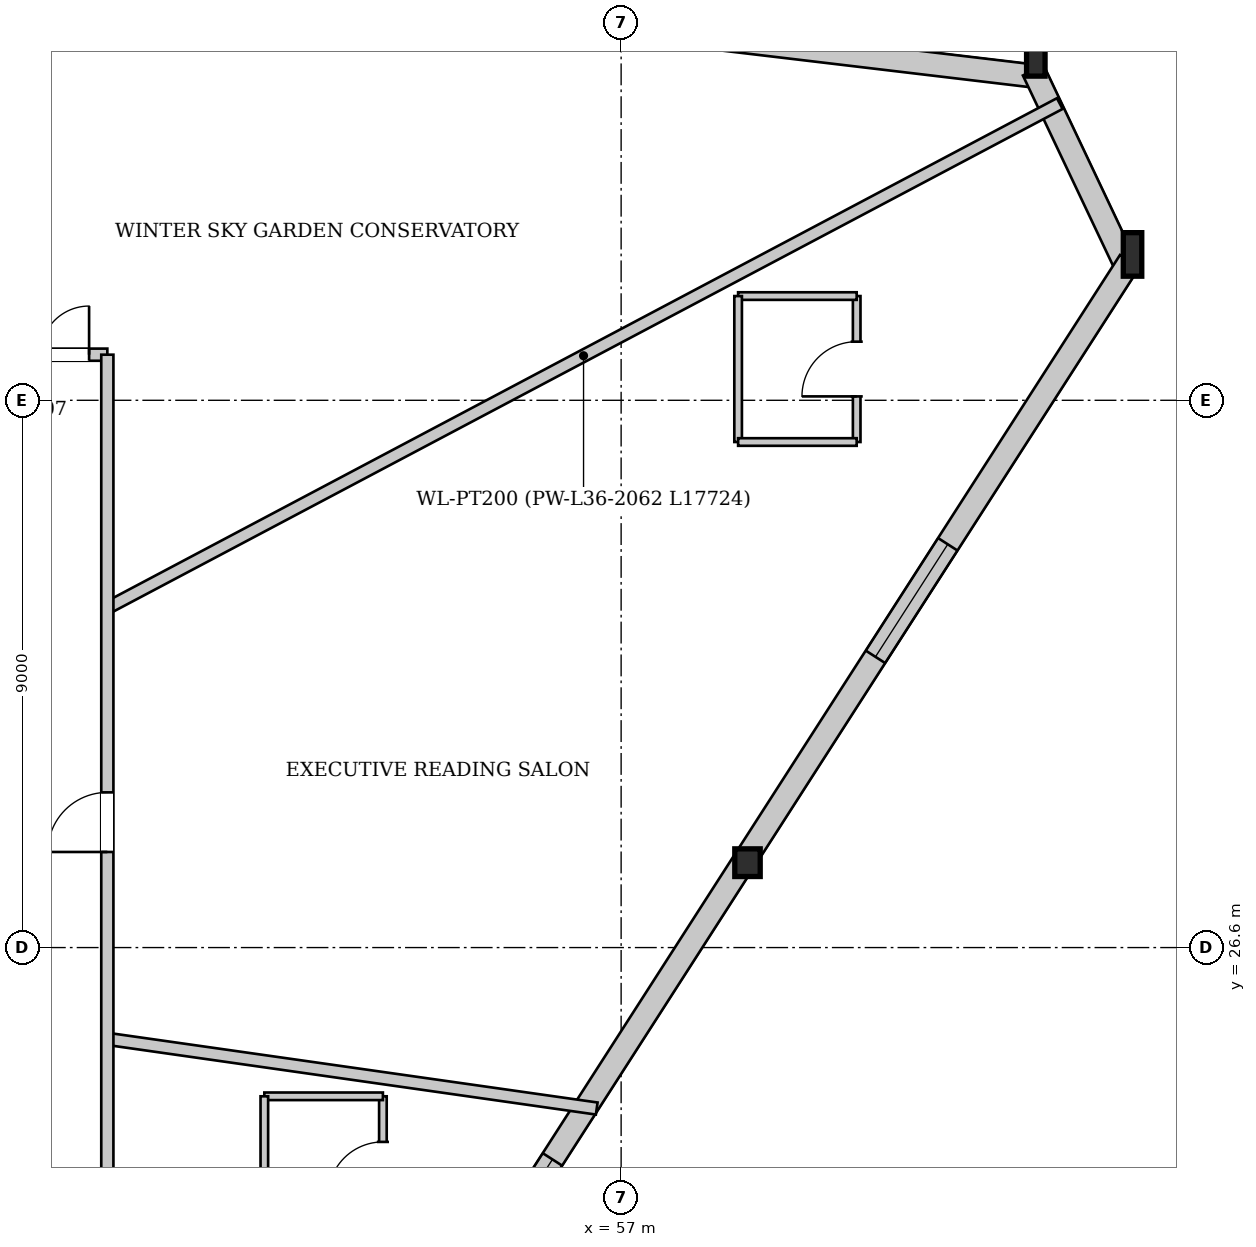
"""IFC4 building model, lengths in metres.
Left out: names, types, materials, properties, quantities, classifications, styles, units other than length and angle.
Written with IfcOpenShell. Run it as: python <this file> out.ifc"""

import sys

from ifc_helpers import new_model, si_unit, direction, frame, frame_2d, origin, origin_2d, place, context, subcontext, project, spatial, rectangle, i_section, extrude, source, transform, mapped, element, fill, save


model = new_model("IFC4")
c1 = context("Model", 3, precision=1e-05, world=origin(), true_north=direction((0.0, 1.0)))
c2 = subcontext(c1, "Body", "Model", "MODEL_VIEW")
j1 = project(units=[si_unit("LENGTHUNIT", "METRE"), si_unit("PLANEANGLEUNIT", "RADIAN")], contexts=[c1])
p1 = place(None, origin())
s1 = spatial("IfcSite", under=j1, at=p1, CompositionType="ELEMENT")
p2 = place(p1, origin())
s2 = spatial("IfcBuilding", under=s1, at=p2, CompositionType="ELEMENT")
p3 = place(p2, frame((0.0, 0.0, 138.1)))
s3 = spatial("IfcBuildingStorey", under=s2, at=p3, CompositionType="ELEMENT", Elevation=138.1)
m1 = source(origin(), c2, "Body", "SweptSolid", [
    extrude(i_section(OverallWidth=0.304, OverallDepth=0.716, WebThickness=0.021, FlangeThickness=0.04, at=origin_2d()), origin(), (0.0, 0.0, 1.0), 3.865),
])
p4 = place(p3, frame((65.524, 37.785, 0.0), z_axis=(-0.05873863121, 0.110719161841, 0.992114429088), x_axis=(-0.883383082939, -0.468651607036, 0.0)))
e1 = element("IfcColumn", 1, at=p4, inside=s3, PredefinedType="COLUMN", context=c2, shape_type="MappedRepresentation", body=[
    mapped(m1, transform((0.0, 0.0, 0.0), x_axis=(1.0, 0.0, 0.0), y_axis=(0.0, 1.0, 0.0), z_axis=(0.0, 0.0, 1.0), scale=1.0)),
])
m2 = source(origin(), c2, "Body", "SweptSolid", [
    extrude(i_section(OverallWidth=0.304, OverallDepth=0.716, WebThickness=0.021, FlangeThickness=0.04, at=origin_2d()), origin(), (0.0, 0.0, 1.0), 3.862),
])
p5 = place(p3, frame((63.951, 41.104, 0.0), z_axis=(-0.067901574351, 0.09553005479, 0.993107942186), x_axis=(-0.815079857812, -0.579348621634, 0.0)))
e2 = element("IfcColumn", 2, at=p5, inside=s3, PredefinedType="COLUMN", context=c2, shape_type="MappedRepresentation", body=[
    mapped(m2, transform((0.0, 0.0, 0.0), x_axis=(1.0, 0.0, 0.0), y_axis=(0.0, 1.0, 0.0), z_axis=(0.0, 0.0, 1.0), scale=1.0)),
])
m3 = source(origin(), c2, "Body", "SweptSolid", [
    extrude(i_section(OverallWidth=0.418, OverallDepth=0.455, WebThickness=0.038, FlangeThickness=0.059, at=origin_2d()), origin(), (0.0, 0.0, 1.0), 3.852),
])
p6 = place(p3, frame((59.119, 27.819, 0.0), z_axis=(-0.021041344042, 0.092024191413, 0.99553443438), x_axis=(-0.97484183657, -0.222897720207, 0.0)))
e3 = element("IfcColumn", 3, at=p6, inside=s3, PredefinedType="COLUMN", context=c2, shape_type="MappedRepresentation", body=[
    mapped(m3, transform((0.0, 0.0, 0.0), x_axis=(1.0, 0.0, 0.0), y_axis=(0.0, 1.0, 0.0), z_axis=(0.0, 0.0, 1.0), scale=1.0)),
])
p7 = place(p3, frame((40.985, 43.643, 0.0), z_axis=(0.0, 0.0, 1.0), x_axis=(0.99301149666, -0.118017657578, 0.0)))
e4 = element("IfcWall", 4, at=p7, inside=s3, PredefinedType="SOLIDWALL", context=c2, shape_type="SweptSolid", body=[
    extrude(rectangle(XDim=23.105, YDim=0.38, at=frame_2d((11.552, 0.0))), origin(), (0.0, 0.0, 1.0), 2.972),
])
p8 = place(p7, frame((5.369, 0.0, 0.602)))
e5 = element("IfcOpeningElement", 5, at=p8, cuts=e4, PredefinedType="OPENING", context=c2, shape_type="SweptSolid", body=[
    extrude(rectangle(XDim=2.2, YDim=2.25, at=frame_2d((1.1, 1.125))), frame((0.0, 0.2, 0.0), z_axis=(0.0, -1.0, 0.0), x_axis=(1.0, 0.0, 0.0)), (0.0, 0.0, 1.0), 0.4),
])
p9 = place(p7, frame((15.536, 0.0, 0.602)))
e6 = element("IfcOpeningElement", 6, at=p9, cuts=e4, PredefinedType="OPENING", context=c2, shape_type="SweptSolid", body=[
    extrude(rectangle(XDim=2.2, YDim=2.25, at=frame_2d((1.1, 1.125))), frame((0.0, 0.2, 0.0), z_axis=(0.0, -1.0, 0.0), x_axis=(1.0, 0.0, 0.0)), (0.0, 0.0, 1.0), 0.4),
])
p10 = place(p3, frame((63.779, 41.023, 0.0), z_axis=(0.0, 0.0, 1.0), x_axis=(0.428160614976, -0.903702654518, 0.0)))
e7 = element("IfcWall", 7, at=p10, inside=s3, PredefinedType="SOLIDWALL", context=c2, shape_type="SweptSolid", body=[
    extrude(rectangle(XDim=3.674, YDim=0.38, at=frame_2d((1.837, 0.0))), origin(), (0.0, 0.0, 1.0), 2.972),
])
p11 = place(p3, frame((65.364, 37.887, 0.0), z_axis=(0.0, 0.0, 1.0), x_axis=(-0.540678429376, -0.84122935993, 0.0)))
e8 = element("IfcWall", 8, at=p11, inside=s3, PredefinedType="SOLIDWALL", context=c2, shape_type="SweptSolid", body=[
    extrude(rectangle(XDim=23.693, YDim=0.38, at=frame_2d((11.847, 0.0))), origin(), (0.0, 0.0, 1.0), 2.972),
])
p12 = place(p11, frame((5.534, 0.0, 0.602)))
e9 = element("IfcOpeningElement", 9, at=p12, cuts=e8, PredefinedType="OPENING", context=c2, shape_type="SweptSolid", body=[
    extrude(rectangle(XDim=2.2, YDim=2.25, at=frame_2d((1.1, 1.125))), frame((0.0, 0.2, 0.0), z_axis=(0.0, -1.0, 0.0), x_axis=(1.0, 0.0, 0.0)), (0.0, 0.0, 1.0), 0.4),
])
p13 = place(p11, frame((17.559, 0.0, 0.602)))
e10 = element("IfcOpeningElement", 10, at=p13, cuts=e8, PredefinedType="OPENING", context=c2, shape_type="SweptSolid", body=[
    extrude(rectangle(XDim=2.2, YDim=2.25, at=frame_2d((1.1, 1.125))), frame((0.0, 0.2, 0.0), z_axis=(0.0, -1.0, 0.0), x_axis=(1.0, 0.0, 0.0)), (0.0, 0.0, 1.0), 0.4),
])
p14 = place(p3, frame((48.55, 32.186, 0.0), z_axis=(0.0, 0.0, 1.0), x_axis=(0.883765466782, 0.467930122694, 0.0)))
e11 = element("IfcWall", 11, at=p14, inside=s3, PredefinedType="PARTITIONING", context=c2, shape_type="SweptSolid", body=[
    extrude(rectangle(XDim=17.724, YDim=0.2, at=frame_2d((8.862, 0.0))), origin(), (0.0, 0.0, 1.0), 3.58),
])
p15 = place(p3, frame((48.55, 25.098, 0.0), z_axis=(0.0, 0.0, 1.0), x_axis=(0.990022637943, -0.140908397052, 0.0)))
e12 = element("IfcWall", 12, at=p15, inside=s3, PredefinedType="PARTITIONING", context=c2, shape_type="SweptSolid", body=[
    extrude(rectangle(XDim=8.129, YDim=0.2, at=frame_2d((4.065, 0.0))), origin(), (0.0, 0.0, 1.0), 3.58),
])
p16 = place(p3, frame((53.082, 21.754, 0.0), z_axis=(0.0, 0.0, 1.0), x_axis=(0.0, 1.0, 0.0)))
e13 = element("IfcWall", 13, at=p16, inside=s3, PredefinedType="PARTITIONING", context=c2, shape_type="SweptSolid", body=[
    extrude(rectangle(XDim=2.4, YDim=0.125, at=frame_2d((1.2, 0.0))), origin(), (0.0, 0.0, 1.0), 3.58),
])
p17 = place(p16, frame((0.75, 0.0, 0.0)))
e14 = element("IfcOpeningElement", 14, at=p17, cuts=e13, PredefinedType="OPENING", context=c2, shape_type="SweptSolid", body=[
    extrude(rectangle(XDim=0.9, YDim=2.1, at=frame_2d((0.45, 1.05))), frame((0.0, 0.073, 0.0), z_axis=(0.0, -1.0, 0.0), x_axis=(1.0, 0.0, 0.0)), (0.0, 0.0, 1.0), 0.145),
])
p18 = place(p3, frame((53.082, 24.154, 0.0), z_axis=(0.0, 0.0, 1.0), x_axis=(-1.0, 0.0, 0.0)))
e15 = element("IfcWall", 15, at=p18, inside=s3, PredefinedType="PARTITIONING", context=c2, shape_type="SweptSolid", body=[
    extrude(rectangle(XDim=1.95, YDim=0.125, at=frame_2d((0.975, 0.0))), origin(), (0.0, 0.0, 1.0), 3.58),
])
p19 = place(p3, frame((51.132, 24.154, 0.0), z_axis=(0.0, 0.0, 1.0), x_axis=(0.0, -1.0, 0.0)))
e16 = element("IfcWall", 16, at=p19, inside=s3, PredefinedType="PARTITIONING", context=c2, shape_type="SweptSolid", body=[
    extrude(rectangle(XDim=2.4, YDim=0.125, at=frame_2d((1.2, 0.0))), origin(), (0.0, 0.0, 1.0), 3.58),
])
p20 = place(p3, frame((60.874, 34.914, 0.0), z_axis=(0.0, 0.0, 1.0), x_axis=(0.0, 1.0, 0.0)))
e17 = element("IfcWall", 17, at=p20, inside=s3, PredefinedType="PARTITIONING", context=c2, shape_type="SweptSolid", body=[
    extrude(rectangle(XDim=2.4, YDim=0.125, at=frame_2d((1.2, 0.0))), origin(), (0.0, 0.0, 1.0), 3.58),
])
p21 = place(p20, frame((0.75, 0.0, 0.0)))
e18 = element("IfcOpeningElement", 18, at=p21, cuts=e17, PredefinedType="OPENING", context=c2, shape_type="SweptSolid", body=[
    extrude(rectangle(XDim=0.9, YDim=2.1, at=frame_2d((0.45, 1.05))), frame((0.0, 0.073, 0.0), z_axis=(0.0, -1.0, 0.0), x_axis=(1.0, 0.0, 0.0)), (0.0, 0.0, 1.0), 0.145),
])
p22 = place(p3, frame((60.874, 37.314, 0.0), z_axis=(0.0, 0.0, 1.0), x_axis=(-1.0, 0.0, 0.0)))
e19 = element("IfcWall", 19, at=p22, inside=s3, PredefinedType="PARTITIONING", context=c2, shape_type="SweptSolid", body=[
    extrude(rectangle(XDim=1.95, YDim=0.125, at=frame_2d((0.975, 0.0))), origin(), (0.0, 0.0, 1.0), 3.58),
])
p23 = place(p3, frame((58.924, 37.314, 0.0), z_axis=(0.0, 0.0, 1.0), x_axis=(0.0, -1.0, 0.0)))
e20 = element("IfcWall", 20, at=p23, inside=s3, PredefinedType="PARTITIONING", context=c2, shape_type="SweptSolid", body=[
    extrude(rectangle(XDim=2.4, YDim=0.125, at=frame_2d((1.2, 0.0))), origin(), (0.0, 0.0, 1.0), 3.58),
])
p24 = place(p3, frame((58.924, 34.914, 0.0), z_axis=(0.0, 0.0, 1.0), x_axis=(1.0, 0.0, 0.0)))
e21 = element("IfcWall", 21, at=p24, inside=s3, PredefinedType="PARTITIONING", context=c2, shape_type="SweptSolid", body=[
    extrude(rectangle(XDim=1.95, YDim=0.125, at=frame_2d((0.975, 0.0))), origin(), (0.0, 0.0, 1.0), 3.58),
])
p25 = place(p3, frame((27.45, 36.35, 0.0), z_axis=(0.0, 0.0, 1.0), x_axis=(1.0, 0.0, 0.0)))
e22 = element("IfcWall", 22, at=p25, inside=s3, PredefinedType="PARTITIONING", context=c2, shape_type="SweptSolid", body=[
    extrude(rectangle(XDim=21.1, YDim=0.2, at=frame_2d((10.55, 0.0))), origin(), (0.0, 0.0, 1.0), 3.58),
])
p26 = place(p25, frame((19.2, 0.0, 0.0)))
e23 = element("IfcOpeningElement", 23, at=p26, cuts=e22, PredefinedType="OPENING", context=c2, shape_type="SweptSolid", body=[
    extrude(rectangle(XDim=1.6, YDim=2.2, at=frame_2d((0.8, 1.1))), frame((0.0, 0.11, 0.0), z_axis=(0.0, -1.0, 0.0), x_axis=(1.0, 0.0, 0.0)), (0.0, 0.0, 1.0), 0.22),
])
p27 = place(p3, frame((48.55, 16.85, 0.0), z_axis=(0.0, 0.0, 1.0), x_axis=(0.0, 1.0, 0.0)))
e24 = element("IfcWall", 24, at=p27, inside=s3, PredefinedType="PARTITIONING", context=c2, shape_type="SweptSolid", body=[
    extrude(rectangle(XDim=19.5, YDim=0.2, at=frame_2d((9.75, 0.0))), origin(), (0.0, 0.0, 1.0), 3.58),
])
p28 = place(p27, frame((11.322, 0.0, 0.0)))
e25 = element("IfcOpeningElement", 25, at=p28, cuts=e24, PredefinedType="OPENING", context=c2, shape_type="SweptSolid", body=[
    extrude(rectangle(XDim=0.98, YDim=2.15, at=frame_2d((0.49, 1.075))), frame((0.0, 0.11, 0.0), z_axis=(0.0, -1.0, 0.0), x_axis=(1.0, 0.0, 0.0)), (0.0, 0.0, 1.0), 0.22),
])
m4 = source(origin(), c2, "Body", "SweptSolid", [
    extrude(rectangle(XDim=2.2, YDim=2.25, at=frame_2d((1.1, 1.125))), frame((0.0, 0.03, 0.0), z_axis=(0.0, -1.0, 0.0), x_axis=(1.0, 0.0, 0.0)), (0.0, 0.0, 1.0), 0.06),
])
p29 = place(p12, origin())
e26 = element("IfcWindow", 26, at=p29, inside=s3, PartitioningType="SINGLE_PANEL", PredefinedType="WINDOW", context=c2, shape_type="MappedRepresentation", body=[
    mapped(m4, transform((0.0, 0.0, 0.0), x_axis=(1.0, 0.0, 0.0), y_axis=(0.0, 1.0, 0.0), z_axis=(0.0, 0.0, 1.0), scale=1.0)),
])
fill(e9, e26)
p30 = place(p13, origin())
e27 = element("IfcWindow", 27, at=p30, inside=s3, PartitioningType="SINGLE_PANEL", PredefinedType="WINDOW", context=c2, shape_type="MappedRepresentation", body=[
    mapped(m4, transform((0.0, 0.0, 0.0), x_axis=(1.0, 0.0, 0.0), y_axis=(0.0, 1.0, 0.0), z_axis=(0.0, 0.0, 1.0), scale=1.0)),
])
fill(e10, e27)
m5 = source(origin(), c2, "Body", "SweptSolid", [
    extrude(rectangle(XDim=0.9, YDim=2.1, at=frame_2d((0.45, 1.05))), frame((0.0, 0.025, 0.0), z_axis=(0.0, -1.0, 0.0), x_axis=(1.0, 0.0, 0.0)), (0.0, 0.0, 1.0), 0.05),
])
p31 = place(p17, origin())
e28 = element("IfcDoor", 28, at=p31, inside=s3, OperationType="SINGLE_SWING_LEFT", PredefinedType="DOOR", context=c2, shape_type="MappedRepresentation", body=[
    mapped(m5, transform((0.0, 0.0, 0.0), x_axis=(1.0, 0.0, 0.0), y_axis=(0.0, 1.0, 0.0), z_axis=(0.0, 0.0, 1.0), scale=1.0)),
])
fill(e14, e28)
p32 = place(p21, origin())
e29 = element("IfcDoor", 29, at=p32, inside=s3, OperationType="SINGLE_SWING_LEFT", PredefinedType="DOOR", context=c2, shape_type="MappedRepresentation", body=[
    mapped(m5, transform((0.0, 0.0, 0.0), x_axis=(1.0, 0.0, 0.0), y_axis=(0.0, 1.0, 0.0), z_axis=(0.0, 0.0, 1.0), scale=1.0)),
])
fill(e18, e29)
m6 = source(origin(), c2, "Body", "SweptSolid", [
    extrude(rectangle(XDim=1.6, YDim=2.2, at=frame_2d((0.8, 1.1))), frame((0.0, 0.025, 0.0), z_axis=(0.0, -1.0, 0.0), x_axis=(1.0, 0.0, 0.0)), (0.0, 0.0, 1.0), 0.05),
])
p33 = place(p26, origin())
e30 = element("IfcDoor", 30, at=p33, inside=s3, OperationType="DOUBLE_DOOR_SINGLE_SWING", PredefinedType="DOOR", context=c2, shape_type="MappedRepresentation", body=[
    mapped(m6, transform((0.0, 0.0, 0.0), x_axis=(1.0, 0.0, 0.0), y_axis=(0.0, 1.0, 0.0), z_axis=(0.0, 0.0, 1.0), scale=1.0)),
])
fill(e23, e30)
m7 = source(origin(), c2, "Body", "SweptSolid", [
    extrude(rectangle(XDim=0.98, YDim=2.15, at=frame_2d((0.49, 1.075))), frame((0.0, 0.025, 0.0), z_axis=(0.0, -1.0, 0.0), x_axis=(1.0, 0.0, 0.0)), (0.0, 0.0, 1.0), 0.05),
])
p34 = place(p28, origin())
e31 = element("IfcDoor", 31, at=p34, inside=s3, OperationType="SINGLE_SWING_LEFT", PredefinedType="DOOR", context=c2, shape_type="MappedRepresentation", body=[
    mapped(m7, transform((0.0, 0.0, 0.0), x_axis=(1.0, 0.0, 0.0), y_axis=(0.0, 1.0, 0.0), z_axis=(0.0, 0.0, 1.0), scale=1.0)),
])
fill(e25, e31)
save(model, sys.argv[1])
